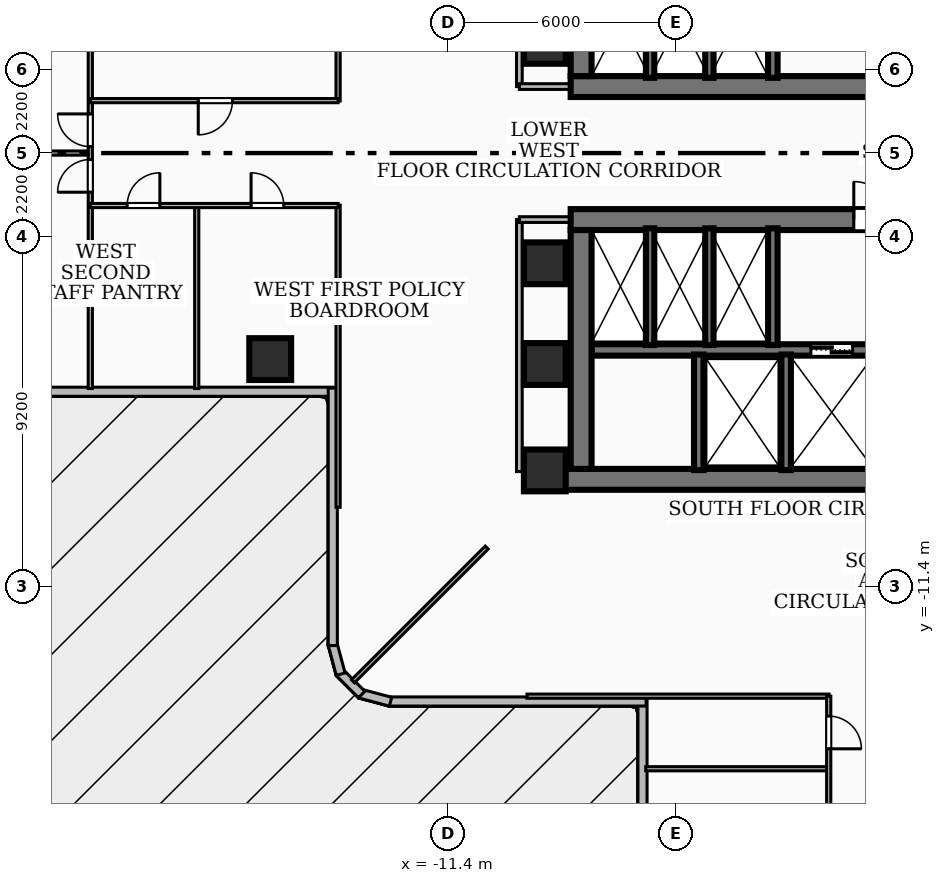
"""IFC4 building model, lengths in metres.
Left out: names, types, materials, properties, quantities, classifications, styles, units other than length and angle.
Written with IfcOpenShell. Run it as: python <this file> out.ifc"""

import sys

from ifc_helpers import new_model, si_unit, direction, frame, frame_2d, origin, origin_2d, place, context, subcontext, project, spatial, rectangle, extrude, element, fill, save


model = new_model("IFC4")
c1 = context("Model", 3, precision=1e-05, world=origin(), true_north=direction((0.0, 1.0)))
c2 = subcontext(c1, "Body", "Model", "MODEL_VIEW")
j1 = project(units=[si_unit("LENGTHUNIT", "METRE"), si_unit("PLANEANGLEUNIT", "RADIAN")], contexts=[c1])
p1 = place(None, origin())
s1 = spatial("IfcSite", under=j1, at=p1, CompositionType="ELEMENT")
p2 = place(p1, origin())
s2 = spatial("IfcBuilding", under=s1, at=p2, CompositionType="ELEMENT")
p3 = place(p2, frame((0.0, 0.0, 24.48)))
s3 = spatial("IfcBuildingStorey", under=s2, at=p3, CompositionType="ELEMENT", Elevation=24.48)
p4 = place(p3, frame((8.17, 1.75, 0.0), z_axis=(0.0, 0.0, 1.0), x_axis=(-1.0, 0.0, 0.0)))
e1 = element("IfcWall", 1, at=p4, inside=s3, PredefinedType="SHEAR", context=c2, shape_type="SweptSolid", body=[
    extrude(rectangle(XDim=16.34, YDim=0.55, at=frame_2d((8.17, 0.0))), origin(), (0.0, 0.0, 1.0), 3.34),
])
p5 = place(p4, frame((7.45, 0.0, 0.0)))
e2 = element("IfcOpeningElement", 2, at=p5, cuts=e1, PredefinedType="OPENING", context=c2, shape_type="SweptSolid", body=[
    extrude(rectangle(XDim=1.0, YDim=2.1, at=frame_2d((0.5, 1.05))), frame((0.0, 0.285, 0.0), z_axis=(0.0, -1.0, 0.0), x_axis=(1.0, 0.0, 0.0)), (0.0, 0.0, 1.0), 0.57),
])
p6 = place(p4, frame((3.4, 0.0, 0.0)))
e3 = element("IfcOpeningElement", 3, at=p6, cuts=e1, PredefinedType="OPENING", context=c2, shape_type="SweptSolid", body=[
    extrude(rectangle(XDim=0.9, YDim=2.06, at=frame_2d((0.45, 1.03))), frame((0.0, 0.285, 0.0), z_axis=(0.0, -1.0, 0.0), x_axis=(1.0, 0.0, 0.0)), (0.0, 0.0, 1.0), 0.57),
])
p7 = place(p4, frame((1.1, 0.0, 0.0)))
e4 = element("IfcOpeningElement", 4, at=p7, cuts=e1, PredefinedType="OPENING", context=c2, shape_type="SweptSolid", body=[
    extrude(rectangle(XDim=0.9, YDim=2.06, at=frame_2d((0.45, 1.03))), frame((0.0, 0.285, 0.0), z_axis=(0.0, -1.0, 0.0), x_axis=(1.0, 0.0, 0.0)), (0.0, 0.0, 1.0), 0.57),
])
p8 = place(p3, frame((-7.895, 2.025, 0.0), z_axis=(0.0, 0.0, 1.0), x_axis=(0.0, 1.0, 0.0)))
e5 = element("IfcWall", 5, at=p8, inside=s3, PredefinedType="SHEAR", context=c2, shape_type="SweptSolid", body=[
    extrude(rectangle(XDim=6.285, YDim=0.55, at=frame_2d((3.143, 0.0))), origin(), (0.0, 0.0, 1.0), 3.34),
])
p9 = place(p3, frame((8.78, -8.585, 0.0), z_axis=(0.0, 0.0, 1.0), x_axis=(-1.0, 0.0, 0.0)))
e6 = element("IfcWall", 6, at=p9, inside=s3, PredefinedType="SHEAR", context=c2, shape_type="SweptSolid", body=[
    extrude(rectangle(XDim=17.56, YDim=0.55, at=frame_2d((8.78, 0.0))), origin(), (0.0, 0.0, 1.0), 3.34),
])
p10 = place(p3, frame((-8.17, -1.75, 0.0), z_axis=(0.0, 0.0, 1.0), x_axis=(1.0, 0.0, 0.0)))
e7 = element("IfcWall", 7, at=p10, inside=s3, PredefinedType="SHEAR", context=c2, shape_type="SweptSolid", body=[
    extrude(rectangle(XDim=16.34, YDim=0.55, at=frame_2d((8.17, 0.0))), origin(), (0.0, 0.0, 1.0), 3.34),
])
p11 = place(p10, frame((7.45, 0.0, 0.0)))
e8 = element("IfcOpeningElement", 8, at=p11, cuts=e7, PredefinedType="OPENING", context=c2, shape_type="SweptSolid", body=[
    extrude(rectangle(XDim=1.0, YDim=2.1, at=frame_2d((0.5, 1.05))), frame((0.0, 0.285, 0.0), z_axis=(0.0, -1.0, 0.0), x_axis=(1.0, 0.0, 0.0)), (0.0, 0.0, 1.0), 0.57),
])
p12 = place(p10, frame((10.965, 0.0, 0.0)))
e9 = element("IfcOpeningElement", 9, at=p12, cuts=e7, PredefinedType="OPENING", context=c2, shape_type="SweptSolid", body=[
    extrude(rectangle(XDim=1.05, YDim=2.15, at=frame_2d((0.525, 1.075))), frame((0.0, 0.285, 0.0), z_axis=(0.0, -1.0, 0.0), x_axis=(1.0, 0.0, 0.0)), (0.0, 0.0, 1.0), 0.57),
])
p13 = place(p10, frame((12.525, 0.0, 0.0)))
e10 = element("IfcOpeningElement", 10, at=p13, cuts=e7, PredefinedType="OPENING", context=c2, shape_type="SweptSolid", body=[
    extrude(rectangle(XDim=1.05, YDim=2.15, at=frame_2d((0.525, 1.075))), frame((0.0, 0.285, 0.0), z_axis=(0.0, -1.0, 0.0), x_axis=(1.0, 0.0, 0.0)), (0.0, 0.0, 1.0), 0.57),
])
p14 = place(p10, frame((14.085, 0.0, 0.0)))
e11 = element("IfcOpeningElement", 11, at=p14, cuts=e7, PredefinedType="OPENING", context=c2, shape_type="SweptSolid", body=[
    extrude(rectangle(XDim=1.05, YDim=2.15, at=frame_2d((0.525, 1.075))), frame((0.0, 0.285, 0.0), z_axis=(0.0, -1.0, 0.0), x_axis=(1.0, 0.0, 0.0)), (0.0, 0.0, 1.0), 0.57),
])
p15 = place(p3, frame((-7.895, -8.31, 0.0), z_axis=(0.0, 0.0, 1.0), x_axis=(0.0, 1.0, 0.0)))
e12 = element("IfcWall", 12, at=p15, inside=s3, PredefinedType="SHEAR", context=c2, shape_type="SweptSolid", body=[
    extrude(rectangle(XDim=6.285, YDim=0.55, at=frame_2d((3.143, 0.0))), origin(), (0.0, 0.0, 1.0), 3.34),
])
p16 = place(p3, frame((-7.62, -5.18, 0.0), z_axis=(0.0, 0.0, 1.0), x_axis=(1.0, 0.0, 0.0)))
e13 = element("IfcWall", 13, at=p16, inside=s3, PredefinedType="SOLIDWALL", context=c2, shape_type="SweptSolid", body=[
    extrude(rectangle(XDim=15.24, YDim=0.3, at=frame_2d((7.62, 0.0))), origin(), (0.0, 0.0, 1.0), 3.34),
])
p17 = place(p16, frame((5.77, 0.0, 0.0)))
e14 = element("IfcOpeningElement", 14, at=p17, cuts=e13, PredefinedType="OPENING", context=c2, shape_type="SweptSolid", body=[
    extrude(rectangle(XDim=1.1, YDim=2.15, at=frame_2d((0.55, 1.075))), frame((0.0, 0.16, 0.0), z_axis=(0.0, -1.0, 0.0), x_axis=(1.0, 0.0, 0.0)), (0.0, 0.0, 1.0), 0.32),
])
p18 = place(p16, frame((7.97, 0.0, 0.0)))
e15 = element("IfcOpeningElement", 15, at=p18, cuts=e13, PredefinedType="OPENING", context=c2, shape_type="SweptSolid", body=[
    extrude(rectangle(XDim=1.0, YDim=2.1, at=frame_2d((0.5, 1.05))), frame((0.0, 0.16, 0.0), z_axis=(0.0, -1.0, 0.0), x_axis=(1.0, 0.0, 0.0)), (0.0, 0.0, 1.0), 0.32),
])
p19 = place(p3, frame((-2.85, 1.98, 0.0), z_axis=(0.0, 0.0, 1.0), x_axis=(0.0, 1.0, 0.0)))
e16 = element("IfcWall", 16, at=p19, inside=s3, PredefinedType="SOLIDWALL", context=c2, shape_type="SweptSolid", body=[
    extrude(rectangle(XDim=3.07, YDim=0.25, at=frame_2d((1.535, 0.0))), origin(), (0.0, 0.0, 1.0), 3.34),
])
for number, where, z_axis, x_axis in (
    (17, (-2.5, -8.34, 0.0), (0.0, 0.0, 1.0), (0.0, 1.0, 0.0)),
    (18, (-4.8, -8.34, 0.0), (0.0, 0.0, 1.0), (0.0, 1.0, 0.0)),
):
    element("IfcWall", number, at=place(p3, frame(where, z_axis=z_axis, x_axis=x_axis)), inside=s3, PredefinedType="SOLIDWALL", context=c2, shape_type="SweptSolid", body=[
        extrude(rectangle(XDim=3.04, YDim=0.25, at=frame_2d((1.52, 0.0))), origin(), (0.0, 0.0, 1.0), 3.34),
    ])
p20 = place(p3, frame((-2.85, -5.05, 0.0), z_axis=(0.0, 0.0, 1.0), x_axis=(0.0, 1.0, 0.0)))
e19 = element("IfcWall", 19, at=p20, inside=s3, PredefinedType="SOLIDWALL", context=c2, shape_type="SweptSolid", body=[
    extrude(rectangle(XDim=3.07, YDim=0.25, at=frame_2d((1.535, 0.0))), origin(), (0.0, 0.0, 1.0), 3.34),
])
for number, where, z_axis, x_axis in (
    (20, (-6.08, 1.98, 0.0), (0.0, 0.0, 1.0), (0.0, 1.0, 0.0)),
    (21, (-4.52, 1.98, 0.0), (0.0, 0.0, 1.0), (0.0, 1.0, 0.0)),
    (22, (-6.08, -5.05, 0.0), (0.0, 0.0, 1.0), (0.0, 1.0, 0.0)),
    (23, (-4.52, -5.05, 0.0), (0.0, 0.0, 1.0), (0.0, 1.0, 0.0)),
):
    element("IfcWall", number, at=place(p3, frame(where, z_axis=z_axis, x_axis=x_axis)), inside=s3, PredefinedType="SOLIDWALL", context=c2, shape_type="SweptSolid", body=[
        extrude(rectangle(XDim=3.07, YDim=0.22, at=frame_2d((1.535, 0.0))), origin(), (0.0, 0.0, 1.0), 3.34),
    ])
for number, where, z_axis, x_axis in (
    (24, (-8.85, -5.55, 0.0), (0.0, 0.0, 1.0), (1.0, 0.0, 0.0)),
    (25, (-8.85, -2.9, 0.0), (0.0, 0.0, 1.0), (1.0, 0.0, 0.0)),
    (26, (-8.85, 2.9, 0.0), (0.0, 0.0, 1.0), (1.0, 0.0, 0.0)),
    (27, (-8.85, -8.35, 0.0), (0.0, 0.0, 1.0), (1.0, 0.0, 0.0)),
    (28, (-16.076, -5.421, 0.0), (0.0, 0.0, 1.0), (1.0, 0.0, 0.0)),
):
    element("IfcColumn", number, at=place(p3, frame(where, z_axis=z_axis, x_axis=x_axis)), inside=s3, PredefinedType="COLUMN", context=c2, shape_type="SweptSolid", body=[
        extrude(rectangle(XDim=1.1, YDim=1.1, at=origin_2d()), origin(), (0.0, 0.0, 1.0), 3.6),
    ])
p21 = place(p3, frame((-14.334, -6.28, 0.0), z_axis=(0.0, 0.0, 1.0), x_axis=(-1.0, 0.0, 0.0)))
e29 = element("IfcWall", 29, at=p21, inside=s3, PredefinedType="SOLIDWALL", context=c2, shape_type="SweptSolid", body=[
    extrude(rectangle(XDim=16.875, YDim=0.24, at=frame_2d((8.438, 0.0))), origin(), (0.0, 0.0, 1.0), 3.34),
])
p22 = place(p21, frame((13.675, 0.0, 0.85)))
e30 = element("IfcOpeningElement", 30, at=p22, cuts=e29, PredefinedType="OPENING", context=c2, shape_type="SweptSolid", body=[
    extrude(rectangle(XDim=2.1, YDim=1.8, at=frame_2d((1.05, 0.9))), frame((0.0, 0.13, 0.0), z_axis=(0.0, -1.0, 0.0), x_axis=(1.0, 0.0, 0.0)), (0.0, 0.0, 1.0), 0.26),
])
p23 = place(p3, frame((-6.28, -27.809, 0.0), z_axis=(0.0, 0.0, 1.0), x_axis=(0.0, 1.0, 0.0)))
e31 = element("IfcWall", 31, at=p23, inside=s3, PredefinedType="SOLIDWALL", context=c2, shape_type="SweptSolid", body=[
    extrude(rectangle(XDim=13.475, YDim=0.24, at=frame_2d((6.738, 0.0))), origin(), (0.0, 0.0, 1.0), 3.34),
])
p24 = place(p23, frame((1.1, 0.0, 0.85)))
e32 = element("IfcOpeningElement", 32, at=p24, cuts=e31, PredefinedType="OPENING", context=c2, shape_type="SweptSolid", body=[
    extrude(rectangle(XDim=1.5, YDim=1.8, at=frame_2d((0.75, 0.9))), frame((0.0, 0.13, 0.0), z_axis=(0.0, -1.0, 0.0), x_axis=(1.0, 0.0, 0.0)), (0.0, 0.0, 1.0), 0.26),
])
p25 = place(p3, frame((-6.184, -14.43, 0.0), z_axis=(0.0, 0.0, 1.0), x_axis=(-1.0, 0.0, 0.0)))
e33 = element("IfcWall", 33, at=p25, inside=s3, PredefinedType="SOLIDWALL", context=c2, shape_type="SweptSolid", body=[
    extrude(rectangle(XDim=6.775, YDim=0.24, at=frame_2d((3.387, 0.0))), origin(), (0.0, 0.0, 1.0), 3.34),
])
p26 = place(p3, frame((-12.91, -14.436, 0.0), z_axis=(0.0, 0.0, 1.0), x_axis=(-0.966161677396, 0.257937227116, 0.0)))
e34 = element("IfcWall", 34, at=p26, inside=s3, PredefinedType="SOLIDWALL", context=c2, shape_type="SweptSolid", body=[
    extrude(rectangle(XDim=0.83, YDim=0.24, at=frame_2d((0.415, 0.0))), origin(), (0.0, 0.0, 1.0), 3.34),
])
p27 = place(p3, frame((-13.67, -14.246, 0.0), z_axis=(0.0, 0.0, 1.0), x_axis=(-0.707106781187, 0.707106781187, 0.0)))
e35 = element("IfcWall", 35, at=p27, inside=s3, PredefinedType="SOLIDWALL", context=c2, shape_type="SweptSolid", body=[
    extrude(rectangle(XDim=0.815, YDim=0.24, at=frame_2d((0.407, 0.0))), origin(), (0.0, 0.0, 1.0), 3.34),
])
p28 = place(p3, frame((-14.222, -13.712, 0.0), z_axis=(0.0, 0.0, 1.0), x_axis=(-0.257937227116, 0.966161677396, 0.0)))
e36 = element("IfcWall", 36, at=p28, inside=s3, PredefinedType="SOLIDWALL", context=c2, shape_type="SweptSolid", body=[
    extrude(rectangle(XDim=0.83, YDim=0.24, at=frame_2d((0.415, 0.0))), origin(), (0.0, 0.0, 1.0), 3.34),
])
p29 = place(p3, frame((-14.43, -12.959, 0.0), z_axis=(0.0, 0.0, 1.0), x_axis=(0.0, 1.0, 0.0)))
e37 = element("IfcWall", 37, at=p29, inside=s3, PredefinedType="SOLIDWALL", context=c2, shape_type="SweptSolid", body=[
    extrude(rectangle(XDim=6.775, YDim=0.24, at=frame_2d((3.387, 0.0))), origin(), (0.0, 0.0, 1.0), 3.34),
])
p30 = place(p3, frame((-9.52, 1.75, 0.0), z_axis=(0.0, 0.0, 1.0), x_axis=(0.0, 1.0, 0.0)))
e38 = element("IfcWall", 38, at=p30, inside=s3, PredefinedType="PARTITIONING", context=c2, shape_type="SweptSolid", body=[
    extrude(rectangle(XDim=6.63, YDim=0.15, at=frame_2d((3.315, 0.0))), origin(), (0.0, 0.0, 1.0), 2.421),
])
p31 = place(p3, frame((-7.85, 1.75, 0.0), z_axis=(0.0, 0.0, 1.0), x_axis=(-1.0, 0.0, 0.0)))
e39 = element("IfcWall", 39, at=p31, inside=s3, PredefinedType="PARTITIONING", context=c2, shape_type="SweptSolid", body=[
    extrude(rectangle(XDim=1.67, YDim=0.15, at=frame_2d((0.835, 0.0))), origin(), (0.0, 0.0, 1.0), 2.405),
])
p32 = place(p3, frame((-9.52, -8.38, 0.0), z_axis=(0.0, 0.0, 1.0), x_axis=(0.0, 1.0, 0.0)))
e40 = element("IfcWall", 40, at=p32, inside=s3, PredefinedType="PARTITIONING", context=c2, shape_type="SweptSolid", body=[
    extrude(rectangle(XDim=6.63, YDim=0.15, at=frame_2d((3.315, 0.0))), origin(), (0.0, 0.0, 1.0), 2.421),
])
p33 = place(p3, frame((-7.85, -1.75, 0.0), z_axis=(0.0, 0.0, 1.0), x_axis=(-1.0, 0.0, 0.0)))
e41 = element("IfcWall", 41, at=p33, inside=s3, PredefinedType="PARTITIONING", context=c2, shape_type="SweptSolid", body=[
    extrude(rectangle(XDim=1.67, YDim=0.15, at=frame_2d((0.835, 0.0))), origin(), (0.0, 0.0, 1.0), 2.405),
])
p34 = place(p3, frame((-10.38, -10.38, 0.0), z_axis=(0.0, 0.0, 1.0), x_axis=(-0.707106781187, -0.707106781187, 0.0)))
e42 = element("IfcWall", 42, at=p34, inside=s3, PredefinedType="PARTITIONING", context=c2, shape_type="SweptSolid", body=[
    extrude(rectangle(XDim=4.975, YDim=0.11, at=frame_2d((2.488, 0.0))), origin(), (0.0, 0.0, 1.0), 3.34),
])
for number, where, z_axis, x_axis in (
    (43, (-14.29, -1.37, 0.0), (0.0, 0.0, 1.0), (0.0, -1.0, 0.0)),
    (44, (-14.29, 9.32, 0.0), (0.0, 0.0, 1.0), (0.0, -1.0, 0.0)),
):
    element("IfcWall", number, at=place(p3, frame(where, z_axis=z_axis, x_axis=x_axis)), inside=s3, PredefinedType="PARTITIONING", context=c2, shape_type="SweptSolid", body=[
        extrude(rectangle(XDim=7.95, YDim=0.11, at=frame_2d((3.975, 0.0))), origin(), (0.0, 0.0, 1.0), 2.421),
    ])
p35 = place(p3, frame((-18.01, -1.4, 0.0), z_axis=(0.0, 0.0, 1.0), x_axis=(0.0, -1.0, 0.0)))
e45 = element("IfcWall", 45, at=p35, inside=s3, PredefinedType="PARTITIONING", context=c2, shape_type="SweptSolid", body=[
    extrude(rectangle(XDim=4.795, YDim=0.11, at=frame_2d((2.397, 0.0))), origin(), (0.0, 0.0, 1.0), 2.421),
])
p36 = place(p3, frame((-20.81, -1.38, 0.0), z_axis=(0.0, 0.0, 1.0), x_axis=(1.0, 0.0, 0.0)))
e46 = element("IfcWall", 46, at=p36, inside=s3, PredefinedType="PARTITIONING", context=c2, shape_type="SweptSolid", body=[
    extrude(rectangle(XDim=6.52, YDim=0.11, at=frame_2d((3.26, 0.0))), origin(), (0.0, 0.0, 1.0), 2.869),
])
p37 = place(p36, frame((4.23, 0.0, 0.0)))
e47 = element("IfcOpeningElement", 47, at=p37, cuts=e46, PredefinedType="OPENING", context=c2, shape_type="SweptSolid", body=[
    extrude(rectangle(XDim=0.86, YDim=2.04, at=frame_2d((0.43, 1.02))), frame((0.0, 0.065, 0.0), z_axis=(0.0, -1.0, 0.0), x_axis=(1.0, 0.0, 0.0)), (0.0, 0.0, 1.0), 0.13),
])
p38 = place(p36, frame((0.97, 0.0, 0.0)))
e48 = element("IfcOpeningElement", 48, at=p38, cuts=e46, PredefinedType="OPENING", context=c2, shape_type="SweptSolid", body=[
    extrude(rectangle(XDim=0.86, YDim=2.04, at=frame_2d((0.43, 1.02))), frame((0.0, 0.065, 0.0), z_axis=(0.0, -1.0, 0.0), x_axis=(1.0, 0.0, 0.0)), (0.0, 0.0, 1.0), 0.13),
])
p39 = place(p3, frame((-14.29, 1.38, 0.0), z_axis=(0.0, 0.0, 1.0), x_axis=(-1.0, 0.0, 0.0)))
e49 = element("IfcWall", 49, at=p39, inside=s3, PredefinedType="PARTITIONING", context=c2, shape_type="SweptSolid", body=[
    extrude(rectangle(XDim=6.52, YDim=0.11, at=frame_2d((3.26, 0.0))), origin(), (0.0, 0.0, 1.0), 2.869),
])
p40 = place(p39, frame((2.78, 0.0, 0.0)))
e50 = element("IfcOpeningElement", 50, at=p40, cuts=e49, PredefinedType="OPENING", context=c2, shape_type="SweptSolid", body=[
    extrude(rectangle(XDim=0.9, YDim=2.06, at=frame_2d((0.45, 1.03))), frame((0.0, 0.065, 0.0), z_axis=(0.0, -1.0, 0.0), x_axis=(1.0, 0.0, 0.0)), (0.0, 0.0, 1.0), 0.13),
])
p41 = place(p3, frame((-20.87, 0.0, 0.0), z_axis=(0.0, 0.0, 1.0), x_axis=(-1.0, 0.0, 0.0)))
e51 = element("IfcWall", 51, at=p41, inside=s3, PredefinedType="PARTITIONING", context=c2, shape_type="SweptSolid", body=[
    extrude(rectangle(XDim=11.725, YDim=0.11, at=frame_2d((5.862, 0.0))), origin(), (0.0, 0.0, 1.0), 2.72),
])
p42 = place(p3, frame((-20.81, -6.195, 0.0), z_axis=(0.0, 0.0, 1.0), x_axis=(0.0, 1.0, 0.0)))
e52 = element("IfcWall", 52, at=p42, inside=s3, PredefinedType="PARTITIONING", context=c2, shape_type="SweptSolid", body=[
    extrude(rectangle(XDim=12.39, YDim=0.11, at=frame_2d((6.195, 0.0))), origin(), (0.0, 0.0, 1.0), 2.421),
])
p43 = place(p42, frame((6.365, 0.0, 0.0)))
e53 = element("IfcOpeningElement", 53, at=p43, cuts=e52, PredefinedType="OPENING", context=c2, shape_type="SweptSolid", body=[
    extrude(rectangle(XDim=0.86, YDim=2.04, at=frame_2d((0.43, 1.02))), frame((0.0, 0.065, 0.0), z_axis=(0.0, -1.0, 0.0), x_axis=(1.0, 0.0, 0.0)), (0.0, 0.0, 1.0), 0.13),
])
p44 = place(p42, frame((5.165, 0.0, 0.0)))
e54 = element("IfcOpeningElement", 54, at=p44, cuts=e52, PredefinedType="OPENING", context=c2, shape_type="SweptSolid", body=[
    extrude(rectangle(XDim=0.86, YDim=2.04, at=frame_2d((0.43, 1.02))), frame((0.0, 0.065, 0.0), z_axis=(0.0, -1.0, 0.0), x_axis=(1.0, 0.0, 0.0)), (0.0, 0.0, 1.0), 0.13),
])
p45 = place(p3, frame((-9.32, -14.29, 0.0), z_axis=(0.0, 0.0, 1.0), x_axis=(1.0, 0.0, 0.0)))
e55 = element("IfcWall", 55, at=p45, inside=s3, PredefinedType="PARTITIONING", context=c2, shape_type="SweptSolid", body=[
    extrude(rectangle(XDim=7.95, YDim=0.11, at=frame_2d((3.975, 0.0))), origin(), (0.0, 0.0, 1.0), 2.421),
])
p46 = place(p3, frame((-6.195, -16.2, 0.0), z_axis=(0.0, 0.0, 1.0), x_axis=(1.0, 0.0, 0.0)))
e56 = element("IfcWall", 56, at=p46, inside=s3, PredefinedType="PARTITIONING", context=c2, shape_type="SweptSolid", body=[
    extrude(rectangle(XDim=4.795, YDim=0.11, at=frame_2d((2.397, 0.0))), origin(), (0.0, 0.0, 1.0), 2.421),
])
p47 = place(p3, frame((-1.38, -14.29, 0.0), z_axis=(0.0, 0.0, 1.0), x_axis=(0.0, -1.0, 0.0)))
e57 = element("IfcWall", 57, at=p47, inside=s3, PredefinedType="PARTITIONING", context=c2, shape_type="SweptSolid", body=[
    extrude(rectangle(XDim=5.98, YDim=0.11, at=frame_2d((2.99, 0.0))), origin(), (0.0, 0.0, 1.0), 2.869),
])
p48 = place(p47, frame((0.525, 0.0, 0.0)))
e58 = element("IfcOpeningElement", 58, at=p48, cuts=e57, PredefinedType="OPENING", context=c2, shape_type="SweptSolid", body=[
    extrude(rectangle(XDim=0.86, YDim=2.04, at=frame_2d((0.43, 1.02))), frame((0.0, 0.065, 0.0), z_axis=(0.0, -1.0, 0.0), x_axis=(1.0, 0.0, 0.0)), (0.0, 0.0, 1.0), 0.13),
])
p49 = place(p47, frame((3.515, 0.0, 0.0)))
e59 = element("IfcOpeningElement", 59, at=p49, cuts=e57, PredefinedType="OPENING", context=c2, shape_type="SweptSolid", body=[
    extrude(rectangle(XDim=0.86, YDim=2.04, at=frame_2d((0.43, 1.02))), frame((0.0, 0.065, 0.0), z_axis=(0.0, -1.0, 0.0), x_axis=(1.0, 0.0, 0.0)), (0.0, 0.0, 1.0), 0.13),
])
p50 = place(p11, origin())
e60 = element("IfcDoor", 60, at=p50, inside=s3, OperationType="SINGLE_SWING_LEFT", PredefinedType="DOOR", context=c2, shape_type="SweptSolid", body=[
    extrude(rectangle(XDim=1.0, YDim=2.1, at=frame_2d((0.5, 1.05))), frame((0.0, 0.025, 0.0), z_axis=(0.0, -1.0, 0.0), x_axis=(1.0, 0.0, 0.0)), (0.0, 0.0, 1.0), 0.05),
])
fill(e8, e60)
p51 = place(p17, origin())
e61 = element("IfcDoor", 61, at=p51, inside=s3, OperationType="DOUBLE_DOOR_SLIDING", PredefinedType="DOOR", context=c2, shape_type="SweptSolid", body=[
    extrude(rectangle(XDim=1.1, YDim=2.15, at=frame_2d((0.55, 1.075))), frame((0.0, 0.025, 0.0), z_axis=(0.0, -1.0, 0.0), x_axis=(1.0, 0.0, 0.0)), (0.0, 0.0, 1.0), 0.05),
])
fill(e14, e61)
p52 = place(p37, origin())
e62 = element("IfcDoor", 62, at=p52, inside=s3, OperationType="SINGLE_SWING_LEFT", PredefinedType="DOOR", context=c2, shape_type="SweptSolid", body=[
    extrude(rectangle(XDim=0.86, YDim=2.04, at=frame_2d((0.43, 1.02))), frame((0.0, 0.025, 0.0), z_axis=(0.0, -1.0, 0.0), x_axis=(1.0, 0.0, 0.0)), (0.0, 0.0, 1.0), 0.05),
])
fill(e47, e62)
p53 = place(p38, origin())
e63 = element("IfcDoor", 63, at=p53, inside=s3, OperationType="SINGLE_SWING_RIGHT", PredefinedType="DOOR", context=c2, shape_type="SweptSolid", body=[
    extrude(rectangle(XDim=0.86, YDim=2.04, at=frame_2d((0.43, 1.02))), frame((0.0, 0.025, 0.0), z_axis=(0.0, -1.0, 0.0), x_axis=(1.0, 0.0, 0.0)), (0.0, 0.0, 1.0), 0.05),
])
fill(e48, e63)
p54 = place(p40, origin())
e64 = element("IfcDoor", 64, at=p54, inside=s3, OperationType="SINGLE_SWING_RIGHT", PredefinedType="DOOR", context=c2, shape_type="SweptSolid", body=[
    extrude(rectangle(XDim=0.9, YDim=2.06, at=frame_2d((0.45, 1.03))), frame((0.0, 0.025, 0.0), z_axis=(0.0, -1.0, 0.0), x_axis=(1.0, 0.0, 0.0)), (0.0, 0.0, 1.0), 0.05),
])
fill(e50, e64)
p55 = place(p43, origin())
e65 = element("IfcDoor", 65, at=p55, inside=s3, OperationType="SINGLE_SWING_RIGHT", PredefinedType="DOOR", context=c2, shape_type="SweptSolid", body=[
    extrude(rectangle(XDim=0.86, YDim=2.04, at=frame_2d((0.43, 1.02))), frame((0.0, 0.025, 0.0), z_axis=(0.0, -1.0, 0.0), x_axis=(1.0, 0.0, 0.0)), (0.0, 0.0, 1.0), 0.05),
])
fill(e53, e65)
p56 = place(p44, origin())
e66 = element("IfcDoor", 66, at=p56, inside=s3, OperationType="SINGLE_SWING_LEFT", PredefinedType="DOOR", context=c2, shape_type="SweptSolid", body=[
    extrude(rectangle(XDim=0.86, YDim=2.04, at=frame_2d((0.43, 1.02))), frame((0.0, 0.025, 0.0), z_axis=(0.0, -1.0, 0.0), x_axis=(1.0, 0.0, 0.0)), (0.0, 0.0, 1.0), 0.05),
])
fill(e54, e66)
p57 = place(p48, origin())
e67 = element("IfcDoor", 67, at=p57, inside=s3, OperationType="SINGLE_SWING_RIGHT", PredefinedType="DOOR", context=c2, shape_type="SweptSolid", body=[
    extrude(rectangle(XDim=0.86, YDim=2.04, at=frame_2d((0.43, 1.02))), frame((0.0, 0.025, 0.0), z_axis=(0.0, -1.0, 0.0), x_axis=(1.0, 0.0, 0.0)), (0.0, 0.0, 1.0), 0.05),
])
fill(e58, e67)
save(model, sys.argv[1])
